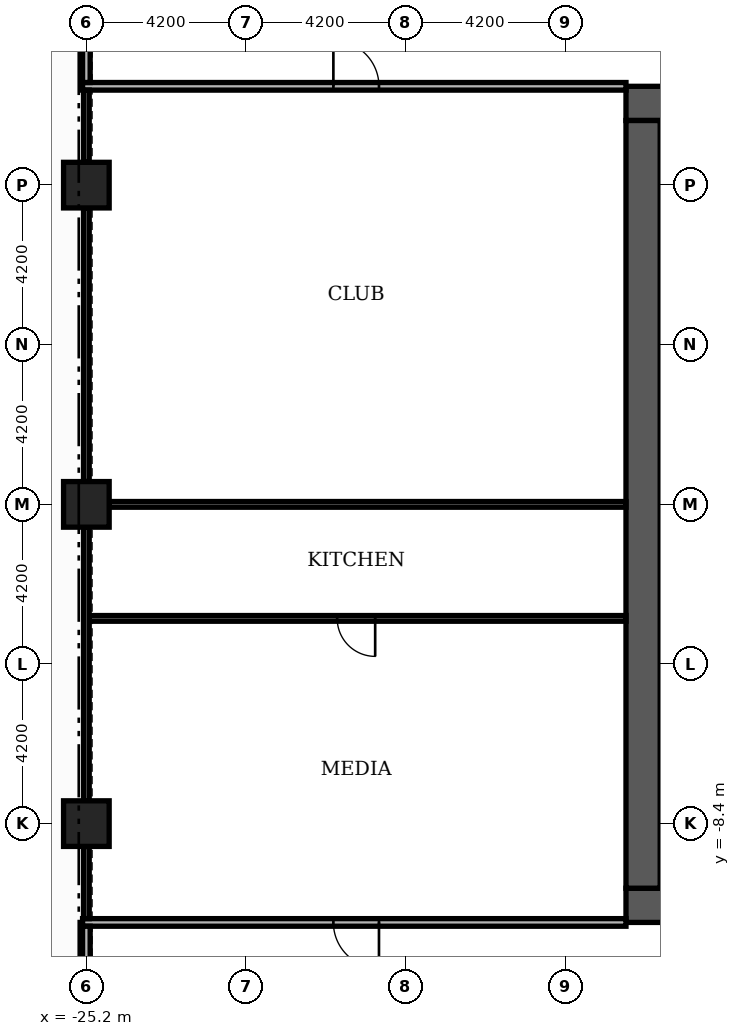
"""IFC4 building model, lengths in metres.
Left out: names, types, materials, properties, quantities, classifications, styles, units other than length and angle.
Written with IfcOpenShell. Run it as: python <this file> out.ifc"""

import sys

from ifc_helpers import new_model, si_unit, direction, frame, frame_2d, origin, origin_2d, place, context, subcontext, project, spatial, rectangle, extrude, element, fill, save


model = new_model("IFC4")
c1 = context("Model", 3, precision=1e-05, world=origin(), true_north=direction((0.0, 1.0)))
c2 = subcontext(c1, "Body", "Model", "MODEL_VIEW")
j1 = project(units=[si_unit("LENGTHUNIT", "METRE"), si_unit("PLANEANGLEUNIT", "RADIAN")], contexts=[c1])
p1 = place(None, origin())
s1 = spatial("IfcSite", under=j1, at=p1, CompositionType="ELEMENT")
p2 = place(p1, origin())
s2 = spatial("IfcBuilding", under=s1, at=p2, CompositionType="ELEMENT")
p3 = place(p2, frame((0.0, 0.0, 22.2)))
s3 = spatial("IfcBuildingStorey", under=s2, at=p3, CompositionType="ELEMENT", Elevation=22.2)
p4 = place(p3, frame((-11.0, -10.55, 0.0), z_axis=(0.0, 0.0, 1.0), x_axis=(1.0, 0.0, 0.0)))
e1 = element("IfcWall", 1, at=p4, inside=s3, PredefinedType="SHEAR", context=c2, shape_type="SweptSolid", body=[
    extrude(rectangle(XDim=22.0, YDim=0.9, at=frame_2d((11.0, 0.0))), origin(), (0.0, 0.0, 1.0), 4.3),
])
p5 = place(p4, frame((7.4, 0.0, 0.0)))
e2 = element("IfcOpeningElement", 2, at=p5, cuts=e1, PredefinedType="OPENING", context=c2, shape_type="SweptSolid", body=[
    extrude(rectangle(XDim=1.8, YDim=2.2, at=frame_2d((0.9, 1.1))), frame((0.0, 0.46, 0.0), z_axis=(0.0, -1.0, 0.0), x_axis=(1.0, 0.0, 0.0)), (0.0, 0.0, 1.0), 0.92),
])
p6 = place(p3, frame((-11.0, 10.55, 0.0), z_axis=(0.0, 0.0, 1.0), x_axis=(1.0, 0.0, 0.0)))
e3 = element("IfcWall", 3, at=p6, inside=s3, PredefinedType="SHEAR", context=c2, shape_type="SweptSolid", body=[
    extrude(rectangle(XDim=22.0, YDim=0.9, at=frame_2d((11.0, 0.0))), origin(), (0.0, 0.0, 1.0), 4.3),
])
p7 = place(p6, frame((13.3, 0.0, 0.0)))
e4 = element("IfcOpeningElement", 4, at=p7, cuts=e3, PredefinedType="OPENING", context=c2, shape_type="SweptSolid", body=[
    extrude(rectangle(XDim=1.8, YDim=2.2, at=frame_2d((0.9, 1.1))), frame((0.0, 0.46, 0.0), z_axis=(0.0, -1.0, 0.0), x_axis=(1.0, 0.0, 0.0)), (0.0, 0.0, 1.0), 0.92),
])
p8 = place(p3, frame((-10.55, -10.1, 0.0), z_axis=(0.0, 0.0, 1.0), x_axis=(0.0, 1.0, 0.0)))
e5 = element("IfcWall", 5, at=p8, inside=s3, PredefinedType="SHEAR", context=c2, shape_type="SweptSolid", body=[
    extrude(rectangle(XDim=20.2, YDim=0.9, at=frame_2d((10.1, 0.0))), origin(), (0.0, 0.0, 1.0), 4.3),
])
for number, where, z_axis, x_axis in (
    (6, (-25.2, 0.0, 0.0), (0.0, 0.0, 1.0), (1.0, 0.0, 0.0)),
    (7, (-25.2, -8.4, 0.0), (0.0, 0.0, 1.0), (1.0, 0.0, 0.0)),
    (8, (-25.2, 8.4, 0.0), (0.0, 0.0, 1.0), (1.0, 0.0, 0.0)),
):
    element("IfcColumn", number, at=place(p3, frame(where, z_axis=z_axis, x_axis=x_axis)), inside=s3, PredefinedType="COLUMN", context=c2, shape_type="SweptSolid", body=[
        extrude(rectangle(XDim=1.2, YDim=1.2, at=origin_2d()), origin(), (0.0, 0.0, 1.0), 4.8),
    ])
p9 = place(p3, frame((-25.3, -11.0, 0.0), z_axis=(0.0, 0.0, 1.0), x_axis=(1.0, 0.0, 0.0)))
e9 = element("IfcWall", 9, at=p9, inside=s3, PredefinedType="PARTITIONING", context=c2, shape_type="SweptSolid", body=[
    extrude(rectangle(XDim=14.3, YDim=0.2, at=frame_2d((7.15, 0.0))), origin(), (0.0, 0.0, 1.0), 4.3),
])
p10 = place(p9, frame((6.6, 0.0, 0.0)))
e10 = element("IfcOpeningElement", 10, at=p10, cuts=e9, PredefinedType="OPENING", context=c2, shape_type="SweptSolid", body=[
    extrude(rectangle(XDim=1.2, YDim=2.2, at=frame_2d((0.6, 1.1))), frame((0.0, 0.11, 0.0), z_axis=(0.0, -1.0, 0.0), x_axis=(1.0, 0.0, 0.0)), (0.0, 0.0, 1.0), 0.22),
])
p11 = place(p3, frame((-25.125, -3.0, 0.0), z_axis=(0.0, 0.0, 1.0), x_axis=(1.0, 0.0, 0.0)))
e11 = element("IfcWall", 11, at=p11, inside=s3, PredefinedType="PARTITIONING", context=c2, shape_type="SweptSolid", body=[
    extrude(rectangle(XDim=14.125, YDim=0.15, at=frame_2d((7.062, 0.0))), origin(), (0.0, 0.0, 1.0), 4.3),
])
p12 = place(p11, frame((6.525, 0.0, 0.0)))
e12 = element("IfcOpeningElement", 12, at=p12, cuts=e11, PredefinedType="OPENING", context=c2, shape_type="SweptSolid", body=[
    extrude(rectangle(XDim=1.0, YDim=2.1, at=frame_2d((0.5, 1.05))), frame((0.0, 0.085, 0.0), z_axis=(0.0, -1.0, 0.0), x_axis=(1.0, 0.0, 0.0)), (0.0, 0.0, 1.0), 0.17),
])
p13 = place(p3, frame((-24.6, 0.0, 0.0), z_axis=(0.0, 0.0, 1.0), x_axis=(1.0, 0.0, 0.0)))
e13 = element("IfcWall", 13, at=p13, inside=s3, PredefinedType="PARTITIONING", context=c2, shape_type="SweptSolid", body=[
    extrude(rectangle(XDim=13.6, YDim=0.15, at=frame_2d((6.8, 0.0))), origin(), (0.0, 0.0, 1.0), 4.3),
])
p14 = place(p3, frame((-25.3, 11.0, 0.0), z_axis=(0.0, 0.0, 1.0), x_axis=(1.0, 0.0, 0.0)))
e14 = element("IfcWall", 14, at=p14, inside=s3, PredefinedType="PARTITIONING", context=c2, shape_type="SweptSolid", body=[
    extrude(rectangle(XDim=14.3, YDim=0.2, at=frame_2d((7.15, 0.0))), origin(), (0.0, 0.0, 1.0), 4.3),
])
p15 = place(p14, frame((6.6, 0.0, 0.0)))
e15 = element("IfcOpeningElement", 15, at=p15, cuts=e14, PredefinedType="OPENING", context=c2, shape_type="SweptSolid", body=[
    extrude(rectangle(XDim=1.2, YDim=2.2, at=frame_2d((0.6, 1.1))), frame((0.0, 0.11, 0.0), z_axis=(0.0, -1.0, 0.0), x_axis=(1.0, 0.0, 0.0)), (0.0, 0.0, 1.0), 0.22),
])
p16 = place(p3, frame((-25.2, -16.2, 0.0), z_axis=(0.0, 0.0, 1.0), x_axis=(0.0, 1.0, 0.0)))
e16 = element("IfcWall", 16, at=p16, inside=s3, PredefinedType="PARTITIONING", context=c2, shape_type="SweptSolid", body=[
    extrude(rectangle(XDim=5.1, YDim=0.2, at=frame_2d((2.55, 0.0))), origin(), (0.0, 0.0, 1.0), 4.3),
])
p17 = place(p16, frame((1.5, 0.0, 0.0)))
e17 = element("IfcOpeningElement", 17, at=p17, cuts=e16, PredefinedType="OPENING", context=c2, shape_type="SweptSolid", body=[
    extrude(rectangle(XDim=1.8, YDim=2.2, at=frame_2d((0.9, 1.1))), frame((0.0, 0.11, 0.0), z_axis=(0.0, -1.0, 0.0), x_axis=(1.0, 0.0, 0.0)), (0.0, 0.0, 1.0), 0.22),
])
p18 = place(p3, frame((-25.2, -10.9, 0.0), z_axis=(0.0, 0.0, 1.0), x_axis=(0.0, 1.0, 0.0)))
e18 = element("IfcWall", 18, at=p18, inside=s3, PredefinedType="PARTITIONING", context=c2, shape_type="SweptSolid", body=[
    extrude(rectangle(XDim=1.9, YDim=0.15, at=frame_2d((0.95, 0.0))), origin(), (0.0, 0.0, 1.0), 4.3),
])
for number, where, z_axis, x_axis in (
    (19, (-25.2, -7.8, 0.0), (0.0, 0.0, 1.0), (0.0, 1.0, 0.0)),
    (20, (-25.2, 0.6, 0.0), (0.0, 0.0, 1.0), (0.0, 1.0, 0.0)),
):
    element("IfcWall", number, at=place(p3, frame(where, z_axis=z_axis, x_axis=x_axis)), inside=s3, PredefinedType="PARTITIONING", context=c2, shape_type="SweptSolid", body=[
        extrude(rectangle(XDim=7.2, YDim=0.15, at=frame_2d((3.6, 0.0))), origin(), (0.0, 0.0, 1.0), 4.3),
    ])
p19 = place(p3, frame((-25.2, 9.0, 0.0), z_axis=(0.0, 0.0, 1.0), x_axis=(0.0, 1.0, 0.0)))
e21 = element("IfcWall", 21, at=p19, inside=s3, PredefinedType="PARTITIONING", context=c2, shape_type="SweptSolid", body=[
    extrude(rectangle(XDim=1.9, YDim=0.15, at=frame_2d((0.95, 0.0))), origin(), (0.0, 0.0, 1.0), 4.3),
])
p20 = place(p3, frame((-25.2, 11.1, 0.0), z_axis=(0.0, 0.0, 1.0), x_axis=(0.0, 1.0, 0.0)))
e22 = element("IfcWall", 22, at=p20, inside=s3, PredefinedType="PARTITIONING", context=c2, shape_type="SweptSolid", body=[
    extrude(rectangle(XDim=5.1, YDim=0.2, at=frame_2d((2.55, 0.0))), origin(), (0.0, 0.0, 1.0), 4.3),
])
p21 = place(p20, frame((1.8, 0.0, 0.0)))
e23 = element("IfcOpeningElement", 23, at=p21, cuts=e22, PredefinedType="OPENING", context=c2, shape_type="SweptSolid", body=[
    extrude(rectangle(XDim=1.8, YDim=2.2, at=frame_2d((0.9, 1.1))), frame((0.0, 0.11, 0.0), z_axis=(0.0, -1.0, 0.0), x_axis=(1.0, 0.0, 0.0)), (0.0, 0.0, 1.0), 0.22),
])
p22 = place(p10, origin())
e24 = element("IfcDoor", 24, at=p22, inside=s3, OperationType="SINGLE_SWING_RIGHT", PredefinedType="DOOR", context=c2, shape_type="SweptSolid", body=[
    extrude(rectangle(XDim=1.2, YDim=2.2, at=frame_2d((0.6, 1.1))), frame((0.0, 0.025, 0.0), z_axis=(0.0, -1.0, 0.0), x_axis=(1.0, 0.0, 0.0)), (0.0, 0.0, 1.0), 0.05),
])
fill(e10, e24)
p23 = place(p12, origin())
e25 = element("IfcDoor", 25, at=p23, inside=s3, OperationType="SINGLE_SWING_RIGHT", PredefinedType="DOOR", context=c2, shape_type="SweptSolid", body=[
    extrude(rectangle(XDim=1.0, YDim=2.1, at=frame_2d((0.5, 1.05))), frame((0.0, 0.025, 0.0), z_axis=(0.0, -1.0, 0.0), x_axis=(1.0, 0.0, 0.0)), (0.0, 0.0, 1.0), 0.05),
])
fill(e12, e25)
p24 = place(p15, origin())
e26 = element("IfcDoor", 26, at=p24, inside=s3, OperationType="SINGLE_SWING_LEFT", PredefinedType="DOOR", context=c2, shape_type="SweptSolid", body=[
    extrude(rectangle(XDim=1.2, YDim=2.2, at=frame_2d((0.6, 1.1))), frame((0.0, 0.025, 0.0), z_axis=(0.0, -1.0, 0.0), x_axis=(1.0, 0.0, 0.0)), (0.0, 0.0, 1.0), 0.05),
])
fill(e15, e26)
save(model, sys.argv[1])
